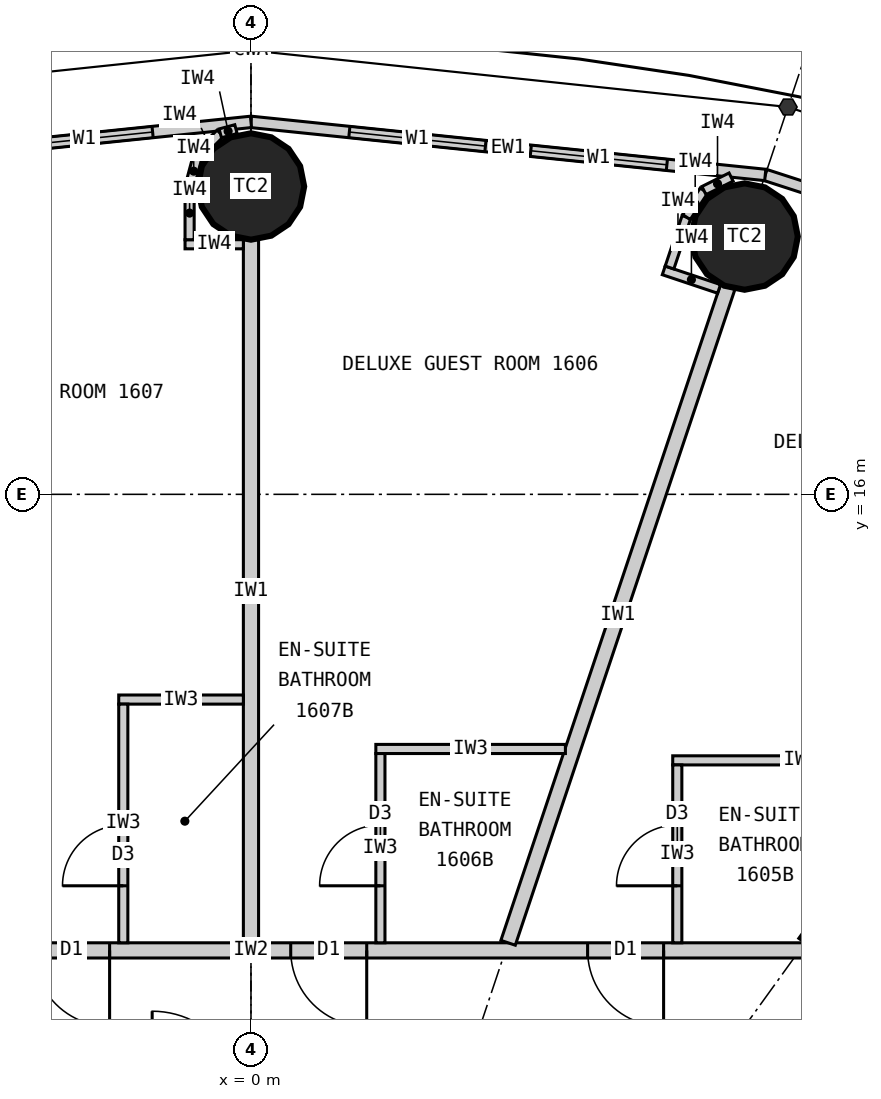
"""IFC4 building model, lengths in metres.
Left out: names, types, materials, properties, quantities, classifications, styles, units other than length and angle.
Written with IfcOpenShell. Run it as: python <this file> out.ifc"""

import sys

from ifc_helpers import new_model, si_unit, direction, frame, frame_2d, origin, origin_2d, place, context, subcontext, project, spatial, rectangle, circle, extrude, element, fill, save


model = new_model("IFC4")
c1 = context("Model", 3, precision=1e-05, world=origin(), true_north=direction((0.0, 1.0)))
c2 = subcontext(c1, "Body", "Model", "MODEL_VIEW")
j1 = project(units=[si_unit("LENGTHUNIT", "METRE"), si_unit("PLANEANGLEUNIT", "RADIAN")], contexts=[c1])
p1 = place(None, origin())
s1 = spatial("IfcSite", under=j1, at=p1, CompositionType="ELEMENT")
p2 = place(p1, origin())
s2 = spatial("IfcBuilding", under=s1, at=p2, CompositionType="ELEMENT")
p3 = place(p2, frame((0.0, 0.0, 67.2)))
s3 = spatial("IfcBuildingStorey", under=s2, at=p3, CompositionType="ELEMENT", Elevation=67.2)
for number, where, z_axis, x_axis in (
    (1, (6.495, 19.391, 0.0), (0.0, 0.0, 1.0), (1.0, 0.0, 0.0)),
    (2, (0.0, 20.05, 0.0), (0.0, 0.0, 1.0), (1.0, 0.0, 0.0)),
):
    element("IfcColumn", number, at=place(p3, frame(where, z_axis=z_axis, x_axis=x_axis)), inside=s3, PredefinedType="COLUMN", context=c2, shape_type="SweptSolid", body=[
        extrude(circle(Radius=0.7, at=origin_2d()), origin(), (0.0, 0.0, 1.0), 3.3),
    ])
p4 = place(p3, frame((13.096, 18.147, 0.0), z_axis=(0.0, 0.0, 1.0), x_axis=(-0.951137534625, 0.308767534285, 0.0)))
e3 = element("IfcWall", 3, at=p4, inside=s3, PredefinedType="ELEMENTEDWALL", context=c2, shape_type="SweptSolid", body=[
    extrude(rectangle(XDim=6.655, YDim=0.15, at=frame_2d((3.328, 0.0))), origin(), (0.0, 0.0, 1.0), 3.12),
])
p5 = place(p4, frame((1.228, 0.0, 0.9)))
e4 = element("IfcOpeningElement", 4, at=p5, cuts=e3, PredefinedType="OPENING", context=c2, shape_type="SweptSolid", body=[
    extrude(rectangle(XDim=1.8, YDim=1.9, at=frame_2d((0.9, 0.95))), frame((0.0, 0.085, 0.0), z_axis=(0.0, -1.0, 0.0), x_axis=(1.0, 0.0, 0.0)), (0.0, 0.0, 1.0), 0.17),
])
p6 = place(p4, frame((3.628, 0.0, 0.9)))
e5 = element("IfcOpeningElement", 5, at=p6, cuts=e3, PredefinedType="OPENING", context=c2, shape_type="SweptSolid", body=[
    extrude(rectangle(XDim=1.8, YDim=1.9, at=frame_2d((0.9, 0.95))), frame((0.0, 0.085, 0.0), z_axis=(0.0, -1.0, 0.0), x_axis=(1.0, 0.0, 0.0)), (0.0, 0.0, 1.0), 0.17),
])
p7 = place(p3, frame((6.766, 20.202, 0.0), z_axis=(0.0, 0.0, 1.0), x_axis=(-0.994721394369, 0.102612609291, 0.0)))
e6 = element("IfcWall", 6, at=p7, inside=s3, PredefinedType="ELEMENTEDWALL", context=c2, shape_type="SweptSolid", body=[
    extrude(rectangle(XDim=6.802, YDim=0.15, at=frame_2d((3.401, 0.0))), origin(), (0.0, 0.0, 1.0), 3.12),
])
p8 = place(p7, frame((1.301, 0.0, 0.9)))
e7 = element("IfcOpeningElement", 7, at=p8, cuts=e6, PredefinedType="OPENING", context=c2, shape_type="SweptSolid", body=[
    extrude(rectangle(XDim=1.8, YDim=1.9, at=frame_2d((0.9, 0.95))), frame((0.0, 0.085, 0.0), z_axis=(0.0, -1.0, 0.0), x_axis=(1.0, 0.0, 0.0)), (0.0, 0.0, 1.0), 0.17),
])
p9 = place(p7, frame((3.701, 0.0, 0.9)))
e8 = element("IfcOpeningElement", 8, at=p9, cuts=e6, PredefinedType="OPENING", context=c2, shape_type="SweptSolid", body=[
    extrude(rectangle(XDim=1.8, YDim=1.9, at=frame_2d((0.9, 0.95))), frame((0.0, 0.085, 0.0), z_axis=(0.0, -1.0, 0.0), x_axis=(1.0, 0.0, 0.0)), (0.0, 0.0, 1.0), 0.17),
])
p10 = place(p3, frame((0.0, 20.9, 0.0), z_axis=(0.0, 0.0, 1.0), x_axis=(-0.994721394369, -0.102612609291, 0.0)))
e9 = element("IfcWall", 9, at=p10, inside=s3, PredefinedType="ELEMENTEDWALL", context=c2, shape_type="SweptSolid", body=[
    extrude(rectangle(XDim=6.802, YDim=0.15, at=frame_2d((3.401, 0.0))), origin(), (0.0, 0.0, 1.0), 3.12),
])
p11 = place(p10, frame((1.301, 0.0, 0.9)))
e10 = element("IfcOpeningElement", 10, at=p11, cuts=e9, PredefinedType="OPENING", context=c2, shape_type="SweptSolid", body=[
    extrude(rectangle(XDim=1.8, YDim=1.9, at=frame_2d((0.9, 0.95))), frame((0.0, 0.085, 0.0), z_axis=(0.0, -1.0, 0.0), x_axis=(1.0, 0.0, 0.0)), (0.0, 0.0, 1.0), 0.17),
])
p12 = place(p10, frame((3.701, 0.0, 0.9)))
e11 = element("IfcOpeningElement", 11, at=p12, cuts=e9, PredefinedType="OPENING", context=c2, shape_type="SweptSolid", body=[
    extrude(rectangle(XDim=1.8, YDim=1.9, at=frame_2d((0.9, 0.95))), frame((0.0, 0.085, 0.0), z_axis=(0.0, -1.0, 0.0), x_axis=(1.0, 0.0, 0.0)), (0.0, 0.0, 1.0), 0.17),
])
p13 = place(p3, frame((-14.1, 10.0, 0.0), z_axis=(0.0, 0.0, 1.0), x_axis=(1.0, 0.0, 0.0)))
e12 = element("IfcWall", 12, at=p13, inside=s3, PredefinedType="PARTITIONING", context=c2, shape_type="SweptSolid", body=[
    extrude(rectangle(XDim=28.2, YDim=0.2, at=frame_2d((14.1, 0.0))), origin(), (0.0, 0.0, 1.0), 3.12),
])
p14 = place(p13, frame((18.529, 0.0, 0.0)))
e13 = element("IfcOpeningElement", 13, at=p14, cuts=e12, PredefinedType="OPENING", context=c2, shape_type="SweptSolid", body=[
    extrude(rectangle(XDim=1.0, YDim=2.2, at=frame_2d((0.5, 1.1))), frame((0.0, 0.11, 0.0), z_axis=(0.0, -1.0, 0.0), x_axis=(1.0, 0.0, 0.0)), (0.0, 0.0, 1.0), 0.22),
])
p15 = place(p13, frame((14.623, 0.0, 0.0)))
e14 = element("IfcOpeningElement", 14, at=p15, cuts=e12, PredefinedType="OPENING", context=c2, shape_type="SweptSolid", body=[
    extrude(rectangle(XDim=1.0, YDim=2.2, at=frame_2d((0.5, 1.1))), frame((0.0, 0.11, 0.0), z_axis=(0.0, -1.0, 0.0), x_axis=(1.0, 0.0, 0.0)), (0.0, 0.0, 1.0), 0.22),
])
p16 = place(p13, frame((11.24, 0.0, 0.0)))
e15 = element("IfcOpeningElement", 15, at=p16, cuts=e12, PredefinedType="OPENING", context=c2, shape_type="SweptSolid", body=[
    extrude(rectangle(XDim=1.0, YDim=2.2, at=frame_2d((0.5, 1.1))), frame((0.0, 0.11, 0.0), z_axis=(0.0, -1.0, 0.0), x_axis=(1.0, 0.0, 0.0)), (0.0, 0.0, 1.0), 0.22),
])
p17 = place(p13, frame((8.671, 0.0, 0.0)))
e16 = element("IfcOpeningElement", 16, at=p17, cuts=e12, PredefinedType="OPENING", context=c2, shape_type="SweptSolid", body=[
    extrude(rectangle(XDim=1.0, YDim=2.2, at=frame_2d((0.5, 1.1))), frame((0.0, 0.11, 0.0), z_axis=(0.0, -1.0, 0.0), x_axis=(1.0, 0.0, 0.0)), (0.0, 0.0, 1.0), 0.22),
])
p18 = place(p13, frame((2.801, 0.0, 0.0)))
e17 = element("IfcOpeningElement", 17, at=p18, cuts=e12, PredefinedType="OPENING", context=c2, shape_type="SweptSolid", body=[
    extrude(rectangle(XDim=1.0, YDim=2.2, at=frame_2d((0.5, 1.1))), frame((0.0, 0.11, 0.0), z_axis=(0.0, -1.0, 0.0), x_axis=(1.0, 0.0, 0.0)), (0.0, 0.0, 1.0), 0.22),
])
p19 = place(p3, frame((7.289, 10.1, 0.0), z_axis=(0.0, 0.0, 1.0), x_axis=(0.585198353053, 0.810890182197, 0.0)))
e18 = element("IfcWall", 18, at=p19, inside=s3, PredefinedType="PARTITIONING", context=c2, shape_type="SweptSolid", body=[
    extrude(rectangle(XDim=8.36, YDim=0.2, at=frame_2d((4.18, 0.0))), origin(), (0.0, 0.0, 1.0), 2.32),
])
p20 = place(p3, frame((3.383, 10.1, 0.0), z_axis=(0.0, 0.0, 1.0), x_axis=(0.31759592231, 0.948226149256, 0.0)))
e19 = element("IfcWall", 19, at=p20, inside=s3, PredefinedType="PARTITIONING", context=c2, shape_type="SweptSolid", body=[
    extrude(rectangle(XDim=9.098, YDim=0.2, at=frame_2d((4.549, 0.0))), origin(), (0.0, 0.0, 1.0), 2.32),
])
p21 = place(p3, frame((0.0, 10.1, 0.0), z_axis=(0.0, 0.0, 1.0), x_axis=(0.0, 1.0, 0.0)))
e20 = element("IfcWall", 20, at=p21, inside=s3, PredefinedType="PARTITIONING", context=c2, shape_type="SweptSolid", body=[
    extrude(rectangle(XDim=9.25, YDim=0.2, at=frame_2d((4.625, 0.0))), origin(), (0.0, 0.0, 1.0), 2.32),
])
p22 = place(p3, frame((8.921, 12.5, 0.0), z_axis=(0.0, 0.0, 1.0), x_axis=(-1.0, 0.0, 0.0)))
e21 = element("IfcWall", 21, at=p22, inside=s3, PredefinedType="PARTITIONING", context=c2, shape_type="SweptSolid", body=[
    extrude(rectangle(XDim=3.372, YDim=0.12, at=frame_2d((1.686, 0.0))), origin(), (0.0, 0.0, 1.0), 3.12),
])
p23 = place(p3, frame((5.609, 10.1, 0.0), z_axis=(0.0, 0.0, 1.0), x_axis=(0.0, 1.0, 0.0)))
e22 = element("IfcWall", 22, at=p23, inside=s3, PredefinedType="PARTITIONING", context=c2, shape_type="SweptSolid", body=[
    extrude(rectangle(XDim=2.34, YDim=0.12, at=frame_2d((1.17, 0.0))), origin(), (0.0, 0.0, 1.0), 3.12),
])
p24 = place(p23, frame((0.75, 0.0, 0.0)))
e23 = element("IfcOpeningElement", 23, at=p24, cuts=e22, PredefinedType="OPENING", context=c2, shape_type="SweptSolid", body=[
    extrude(rectangle(XDim=0.8, YDim=2.1, at=frame_2d((0.4, 1.05))), frame((0.0, 0.07, 0.0), z_axis=(0.0, -1.0, 0.0), x_axis=(1.0, 0.0, 0.0)), (0.0, 0.0, 1.0), 0.14),
])
p25 = place(p3, frame((4.137, 12.65, 0.0), z_axis=(0.0, 0.0, 1.0), x_axis=(-1.0, 0.0, 0.0)))
e24 = element("IfcWall", 24, at=p25, inside=s3, PredefinedType="PARTITIONING", context=c2, shape_type="SweptSolid", body=[
    extrude(rectangle(XDim=2.494, YDim=0.12, at=frame_2d((1.247, 0.0))), origin(), (0.0, 0.0, 1.0), 3.12),
])
p26 = place(p3, frame((1.703, 10.1, 0.0), z_axis=(0.0, 0.0, 1.0), x_axis=(0.0, 1.0, 0.0)))
e25 = element("IfcWall", 25, at=p26, inside=s3, PredefinedType="PARTITIONING", context=c2, shape_type="SweptSolid", body=[
    extrude(rectangle(XDim=2.49, YDim=0.12, at=frame_2d((1.245, 0.0))), origin(), (0.0, 0.0, 1.0), 3.12),
])
p27 = place(p26, frame((0.75, 0.0, 0.0)))
e26 = element("IfcOpeningElement", 26, at=p27, cuts=e25, PredefinedType="OPENING", context=c2, shape_type="SweptSolid", body=[
    extrude(rectangle(XDim=0.8, YDim=2.1, at=frame_2d((0.4, 1.05))), frame((0.0, 0.07, 0.0), z_axis=(0.0, -1.0, 0.0), x_axis=(1.0, 0.0, 0.0)), (0.0, 0.0, 1.0), 0.14),
])
p28 = place(p3, frame((-0.1, 13.3, 0.0), z_axis=(0.0, 0.0, 1.0), x_axis=(-1.0, 0.0, 0.0)))
e27 = element("IfcWall", 27, at=p28, inside=s3, PredefinedType="PARTITIONING", context=c2, shape_type="SweptSolid", body=[
    extrude(rectangle(XDim=1.64, YDim=0.12, at=frame_2d((0.82, 0.0))), origin(), (0.0, 0.0, 1.0), 3.12),
])
p29 = place(p3, frame((-1.68, 10.1, 0.0), z_axis=(0.0, 0.0, 1.0), x_axis=(0.0, 1.0, 0.0)))
e28 = element("IfcWall", 28, at=p29, inside=s3, PredefinedType="PARTITIONING", context=c2, shape_type="SweptSolid", body=[
    extrude(rectangle(XDim=3.14, YDim=0.12, at=frame_2d((1.57, 0.0))), origin(), (0.0, 0.0, 1.0), 3.12),
])
p30 = place(p29, frame((0.75, 0.0, 0.0)))
e29 = element("IfcOpeningElement", 29, at=p30, cuts=e28, PredefinedType="OPENING", context=c2, shape_type="SweptSolid", body=[
    extrude(rectangle(XDim=0.8, YDim=2.1, at=frame_2d((0.4, 1.05))), frame((0.0, 0.07, 0.0), z_axis=(0.0, -1.0, 0.0), x_axis=(1.0, 0.0, 0.0)), (0.0, 0.0, 1.0), 0.14),
])
p31 = place(p3, frame((6.159, 18.702, 0.0), z_axis=(0.0, 0.0, 1.0), x_axis=(-0.948173154049, 0.31775410295, 0.0)))
e30 = element("IfcWall", 30, at=p31, inside=s3, PredefinedType="PARTITIONING", context=c2, shape_type="SweptSolid", body=[
    extrude(rectangle(XDim=0.768, YDim=0.12, at=frame_2d((0.384, 0.0))), origin(), (0.0, 0.0, 1.0), 3.12),
])
p32 = place(p3, frame((5.507, 18.984, 0.0), z_axis=(0.0, 0.0, 1.0), x_axis=(0.317692050622, 0.948193946918, 0.0)))
e31 = element("IfcWall", 31, at=p32, inside=s3, PredefinedType="PARTITIONING", context=c2, shape_type="SweptSolid", body=[
    extrude(rectangle(XDim=0.7, YDim=0.12, at=frame_2d((0.35, 0.0))), origin(), (0.0, 0.0, 1.0), 3.12),
])
p33 = place(p3, frame((5.729, 19.648, 0.0), z_axis=(0.0, 0.0, 1.0), x_axis=(0.552135764955, 0.833754218615, 0.0)))
e32 = element("IfcWall", 32, at=p33, inside=s3, PredefinedType="PARTITIONING", context=c2, shape_type="SweptSolid", body=[
    extrude(rectangle(XDim=0.418, YDim=0.12, at=frame_2d((0.209, 0.0))), origin(), (0.0, 0.0, 1.0), 3.12),
])
p34 = place(p3, frame((5.96, 19.996, 0.0), z_axis=(0.0, 0.0, 1.0), x_axis=(0.895160725913, 0.445743507842, 0.0)))
e33 = element("IfcWall", 33, at=p34, inside=s3, PredefinedType="PARTITIONING", context=c2, shape_type="SweptSolid", body=[
    extrude(rectangle(XDim=0.399, YDim=0.12, at=frame_2d((0.199, 0.0))), origin(), (0.0, 0.0, 1.0), 3.12),
])
p35 = place(p3, frame((-0.1, 19.29, 0.0), z_axis=(0.0, 0.0, 1.0), x_axis=(-1.0, 0.0, 0.0)))
e34 = element("IfcWall", 34, at=p35, inside=s3, PredefinedType="PARTITIONING", context=c2, shape_type="SweptSolid", body=[
    extrude(rectangle(XDim=0.767, YDim=0.12, at=frame_2d((0.384, 0.0))), origin(), (0.0, 0.0, 1.0), 3.12),
])
p36 = place(p3, frame((-0.808, 19.35, 0.0), z_axis=(0.0, 0.0, 1.0), x_axis=(0.0, 1.0, 0.0)))
e35 = element("IfcWall", 35, at=p36, inside=s3, PredefinedType="PARTITIONING", context=c2, shape_type="SweptSolid", body=[
    extrude(rectangle(XDim=0.7, YDim=0.12, at=frame_2d((0.35, 0.0))), origin(), (0.0, 0.0, 1.0), 3.12),
])
p37 = place(p3, frame((-0.808, 20.05, 0.0), z_axis=(0.0, 0.0, 1.0), x_axis=(0.2592614205, 0.965807183573, 0.0)))
e36 = element("IfcWall", 36, at=p37, inside=s3, PredefinedType="PARTITIONING", context=c2, shape_type="SweptSolid", body=[
    extrude(rectangle(XDim=0.418, YDim=0.12, at=frame_2d((0.209, 0.0))), origin(), (0.0, 0.0, 1.0), 3.12),
])
p38 = place(p3, frame((-0.699, 20.454, 0.0), z_axis=(0.0, 0.0, 1.0), x_axis=(0.707106781187, 0.707106781187, 0.0)))
e37 = element("IfcWall", 37, at=p38, inside=s3, PredefinedType="PARTITIONING", context=c2, shape_type="SweptSolid", body=[
    extrude(rectangle(XDim=0.418, YDim=0.12, at=frame_2d((0.209, 0.0))), origin(), (0.0, 0.0, 1.0), 3.12),
])
p39 = place(p3, frame((-0.404, 20.749, 0.0), z_axis=(0.0, 0.0, 1.0), x_axis=(0.965759066438, 0.25944060128, 0.0)))
e38 = element("IfcWall", 38, at=p39, inside=s3, PredefinedType="PARTITIONING", context=c2, shape_type="SweptSolid", body=[
    extrude(rectangle(XDim=0.214, YDim=0.12, at=frame_2d((0.107, 0.0))), origin(), (0.0, 0.0, 1.0), 3.12),
])
p40 = place(p8, origin())
e39 = element("IfcWindow", 39, at=p40, inside=s3, PartitioningType="SINGLE_PANEL", PredefinedType="WINDOW", context=c2, shape_type="SweptSolid", body=[
    extrude(rectangle(XDim=1.8, YDim=1.9, at=frame_2d((0.9, 0.95))), frame((0.0, 0.03, 0.0), z_axis=(0.0, -1.0, 0.0), x_axis=(1.0, 0.0, 0.0)), (0.0, 0.0, 1.0), 0.06),
])
fill(e7, e39)
p41 = place(p9, origin())
e40 = element("IfcWindow", 40, at=p41, inside=s3, PartitioningType="SINGLE_PANEL", PredefinedType="WINDOW", context=c2, shape_type="SweptSolid", body=[
    extrude(rectangle(XDim=1.8, YDim=1.9, at=frame_2d((0.9, 0.95))), frame((0.0, 0.03, 0.0), z_axis=(0.0, -1.0, 0.0), x_axis=(1.0, 0.0, 0.0)), (0.0, 0.0, 1.0), 0.06),
])
fill(e8, e40)
p42 = place(p11, origin())
e41 = element("IfcWindow", 41, at=p42, inside=s3, PartitioningType="SINGLE_PANEL", PredefinedType="WINDOW", context=c2, shape_type="SweptSolid", body=[
    extrude(rectangle(XDim=1.8, YDim=1.9, at=frame_2d((0.9, 0.95))), frame((0.0, 0.03, 0.0), z_axis=(0.0, -1.0, 0.0), x_axis=(1.0, 0.0, 0.0)), (0.0, 0.0, 1.0), 0.06),
])
fill(e10, e41)
p43 = place(p24, origin())
e42 = element("IfcDoor", 42, at=p43, inside=s3, OperationType="SINGLE_SWING_LEFT", PredefinedType="DOOR", context=c2, shape_type="SweptSolid", body=[
    extrude(rectangle(XDim=0.8, YDim=2.1, at=frame_2d((0.4, 1.05))), frame((0.0, 0.025, 0.0), z_axis=(0.0, -1.0, 0.0), x_axis=(1.0, 0.0, 0.0)), (0.0, 0.0, 1.0), 0.05),
])
fill(e23, e42)
p44 = place(p14, origin())
e43 = element("IfcDoor", 43, at=p44, inside=s3, OperationType="SINGLE_SWING_RIGHT", PredefinedType="DOOR", context=c2, shape_type="SweptSolid", body=[
    extrude(rectangle(XDim=1.0, YDim=2.2, at=frame_2d((0.5, 1.1))), frame((0.0, 0.025, 0.0), z_axis=(0.0, -1.0, 0.0), x_axis=(1.0, 0.0, 0.0)), (0.0, 0.0, 1.0), 0.05),
])
fill(e13, e43)
p45 = place(p27, origin())
e44 = element("IfcDoor", 44, at=p45, inside=s3, OperationType="SINGLE_SWING_LEFT", PredefinedType="DOOR", context=c2, shape_type="SweptSolid", body=[
    extrude(rectangle(XDim=0.8, YDim=2.1, at=frame_2d((0.4, 1.05))), frame((0.0, 0.025, 0.0), z_axis=(0.0, -1.0, 0.0), x_axis=(1.0, 0.0, 0.0)), (0.0, 0.0, 1.0), 0.05),
])
fill(e26, e44)
p46 = place(p15, origin())
e45 = element("IfcDoor", 45, at=p46, inside=s3, OperationType="SINGLE_SWING_RIGHT", PredefinedType="DOOR", context=c2, shape_type="SweptSolid", body=[
    extrude(rectangle(XDim=1.0, YDim=2.2, at=frame_2d((0.5, 1.1))), frame((0.0, 0.025, 0.0), z_axis=(0.0, -1.0, 0.0), x_axis=(1.0, 0.0, 0.0)), (0.0, 0.0, 1.0), 0.05),
])
fill(e14, e45)
p47 = place(p30, origin())
e46 = element("IfcDoor", 46, at=p47, inside=s3, OperationType="SINGLE_SWING_LEFT", PredefinedType="DOOR", context=c2, shape_type="SweptSolid", body=[
    extrude(rectangle(XDim=0.8, YDim=2.1, at=frame_2d((0.4, 1.05))), frame((0.0, 0.025, 0.0), z_axis=(0.0, -1.0, 0.0), x_axis=(1.0, 0.0, 0.0)), (0.0, 0.0, 1.0), 0.05),
])
fill(e29, e46)
p48 = place(p16, origin())
e47 = element("IfcDoor", 47, at=p48, inside=s3, OperationType="SINGLE_SWING_RIGHT", PredefinedType="DOOR", context=c2, shape_type="SweptSolid", body=[
    extrude(rectangle(XDim=1.0, YDim=2.2, at=frame_2d((0.5, 1.1))), frame((0.0, 0.025, 0.0), z_axis=(0.0, -1.0, 0.0), x_axis=(1.0, 0.0, 0.0)), (0.0, 0.0, 1.0), 0.05),
])
fill(e15, e47)
save(model, sys.argv[1])
